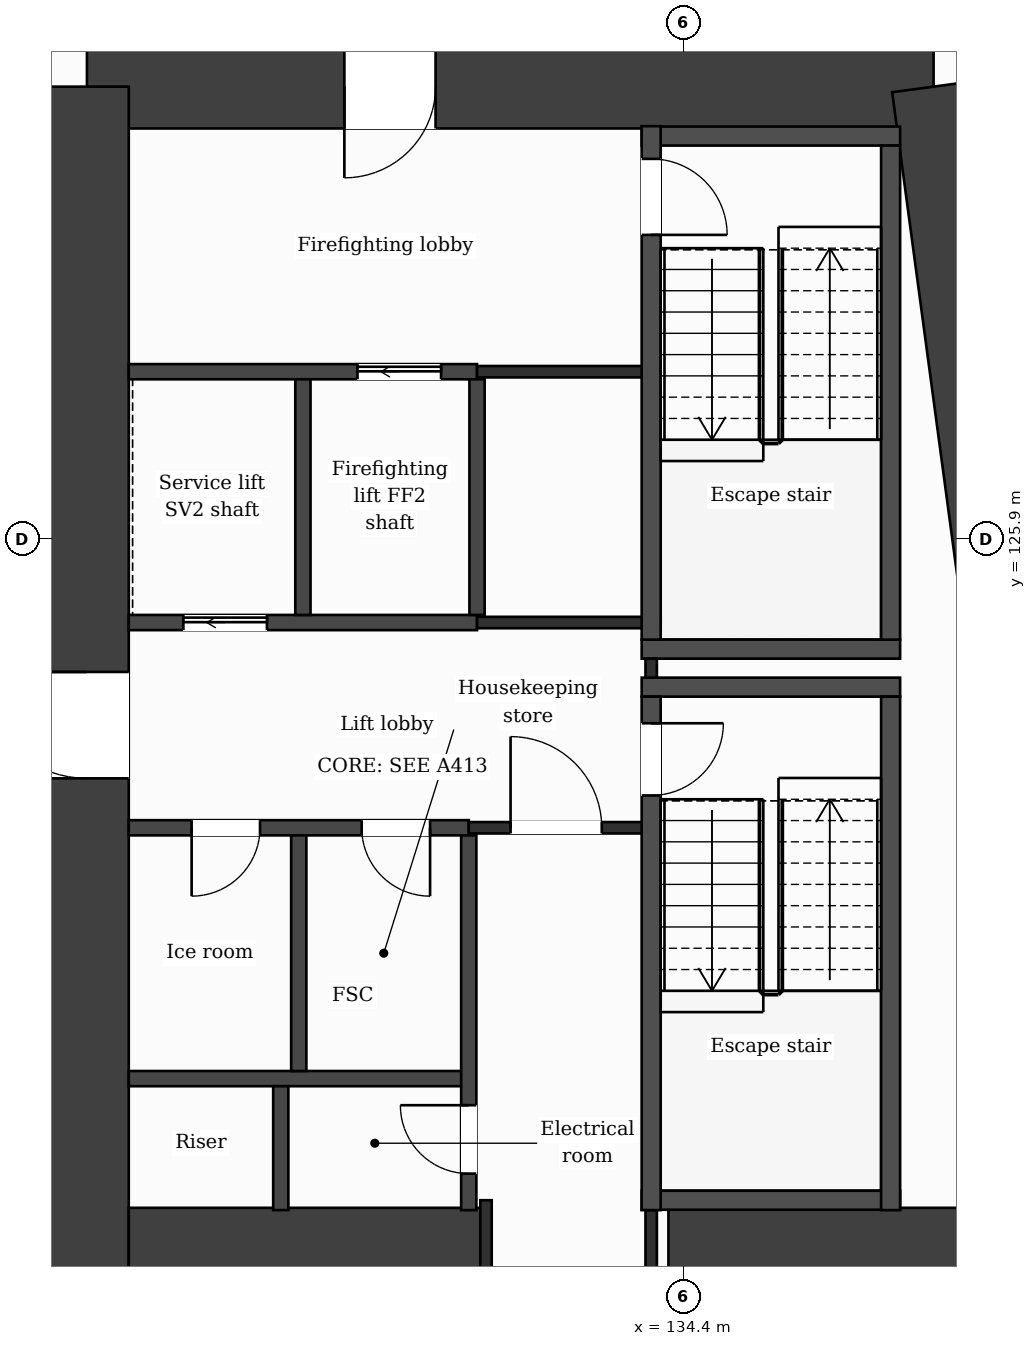
"""IFC4 building model, lengths in metres.
Left out: names, types, materials, properties, quantities, classifications, styles, units other than length and angle.
Written with IfcOpenShell. Run it as: python <this file> out.ifc"""

import sys

from ifc_helpers import new_model, si_unit, direction, frame, frame_2d, origin, place, context, subcontext, project, spatial, rectangle, extrude, element, fill, save


model = new_model("IFC4")
c1 = context("Model", 3, precision=1e-05, world=origin(), true_north=direction((0.0, 1.0)))
c2 = subcontext(c1, "Body", "Model", "MODEL_VIEW")
j1 = project(units=[si_unit("LENGTHUNIT", "METRE"), si_unit("PLANEANGLEUNIT", "RADIAN")], contexts=[c1])
p1 = place(None, origin())
s1 = spatial("IfcSite", under=j1, at=p1, CompositionType="ELEMENT")
p2 = place(p1, origin())
s2 = spatial("IfcBuilding", under=s1, at=p2, CompositionType="ELEMENT")
p3 = place(p2, frame((0.0, 0.0, 60.0)))
s3 = spatial("IfcBuildingStorey", under=s2, at=p3, CompositionType="ELEMENT", Elevation=60.0)
p4 = place(p3, frame((126.55, 131.85, 0.0), z_axis=(0.0, 0.0, 1.0), x_axis=(1.0, 0.0, 0.0)))
e1 = element("IfcWall", 1, at=p4, inside=s3, PredefinedType="SHEAR", context=c2, shape_type="SweptSolid", body=[
    extrude(rectangle(XDim=11.138, YDim=1.1, at=frame_2d((5.569, 0.0))), origin(), (0.0, 0.0, 1.0), 3.5),
])
p5 = place(p4, frame((3.386, 0.0, 0.0)))
e2 = element("IfcOpeningElement", 2, at=p5, cuts=e1, PredefinedType="OPENING", context=c2, shape_type="SweptSolid", body=[
    extrude(rectangle(XDim=1.2, YDim=2.1, at=frame_2d((0.6, 1.05))), frame((0.0, 0.56, 0.0), z_axis=(0.0, -1.0, 0.0), x_axis=(1.0, 0.0, 0.0)), (0.0, 0.0, 1.0), 1.12),
])
p6 = place(p3, frame((137.688, 131.85, 0.0), z_axis=(0.0, 0.0, 1.0), x_axis=(0.133411793472, -0.991060691059, 0.0)))
e3 = element("IfcWall", 3, at=p6, inside=s3, PredefinedType="SHEAR", context=c2, shape_type="SweptSolid", body=[
    extrude(rectangle(XDim=21.089, YDim=1.1, at=frame_2d((10.544, 0.0))), origin(), (0.0, 0.0, 1.0), 3.5),
])
p7 = place(p3, frame((126.55, 110.95, 0.0), z_axis=(0.0, 0.0, 1.0), x_axis=(0.0, 1.0, 0.0)))
e4 = element("IfcWall", 4, at=p7, inside=s3, PredefinedType="SHEAR", context=c2, shape_type="SweptSolid", body=[
    extrude(rectangle(XDim=20.9, YDim=1.1, at=frame_2d((10.45, 0.0))), origin(), (0.0, 0.0, 1.0), 3.5),
])
p8 = place(p7, frame((11.8, 0.0, 0.0)))
e5 = element("IfcOpeningElement", 5, at=p8, cuts=e4, PredefinedType="OPENING", context=c2, shape_type="SweptSolid", body=[
    extrude(rectangle(XDim=1.4, YDim=2.1, at=frame_2d((0.7, 1.05))), frame((0.0, 0.56, 0.0), z_axis=(0.0, -1.0, 0.0), x_axis=(1.0, 0.0, 0.0)), (0.0, 0.0, 1.0), 1.12),
])
p9 = place(p3, frame((127.1, 116.55, 0.0), z_axis=(0.0, 0.0, 1.0), x_axis=(1.0, 0.0, 0.0)))
e6 = element("IfcWall", 6, at=p9, inside=s3, PredefinedType="SHEAR", context=c2, shape_type="SweptSolid", body=[
    extrude(rectangle(XDim=4.7, YDim=1.1, at=frame_2d((2.35, 0.0))), origin(), (0.0, 0.0, 1.0), 3.5),
])
p10 = place(p3, frame((134.2, 116.55, 0.0), z_axis=(0.0, 0.0, 1.0), x_axis=(1.0, 0.0, 0.0)))
e7 = element("IfcWall", 7, at=p10, inside=s3, PredefinedType="SHEAR", context=c2, shape_type="SweptSolid", body=[
    extrude(rectangle(XDim=5.077, YDim=1.1, at=frame_2d((2.539, 0.0))), origin(), (0.0, 0.0, 1.0), 3.5),
])
p11 = place(p3, frame((133.848, 117.2, 0.0), z_axis=(0.0, 0.0, 1.0), x_axis=(1.0, 0.0, 0.0)))
e8 = element("IfcWall", 8, at=p11, inside=s3, PredefinedType="PARTITIONING", context=c2, shape_type="SweptSolid", body=[
    extrude(rectangle(XDim=3.4, YDim=0.25, at=frame_2d((1.7, 0.0))), origin(), (0.0, 0.0, 1.0), 3.18),
])
p12 = place(p3, frame((127.1, 118.8, 0.0), z_axis=(0.0, 0.0, 1.0), x_axis=(1.0, 0.0, 0.0)))
e9 = element("IfcWall", 9, at=p12, inside=s3, PredefinedType="PARTITIONING", context=c2, shape_type="SweptSolid", body=[
    extrude(rectangle(XDim=4.473, YDim=0.2, at=frame_2d((2.236, 0.0))), origin(), (0.0, 0.0, 1.0), 3.18),
])
p13 = place(p3, frame((127.1, 122.1, 0.0), z_axis=(0.0, 0.0, 1.0), x_axis=(1.0, 0.0, 0.0)))
e10 = element("IfcWall", 10, at=p13, inside=s3, PredefinedType="PARTITIONING", context=c2, shape_type="SweptSolid", body=[
    extrude(rectangle(XDim=4.473, YDim=0.2, at=frame_2d((2.236, 0.0))), origin(), (0.0, 0.0, 1.0), 3.18),
])
p14 = place(p13, frame((3.064, 0.0, 0.0)))
e11 = element("IfcOpeningElement", 11, at=p14, cuts=e10, PredefinedType="OPENING", context=c2, shape_type="SweptSolid", body=[
    extrude(rectangle(XDim=0.9, YDim=2.1, at=frame_2d((0.45, 1.05))), frame((0.0, 0.11, 0.0), z_axis=(0.0, -1.0, 0.0), x_axis=(1.0, 0.0, 0.0)), (0.0, 0.0, 1.0), 0.22),
])
p15 = place(p13, frame((0.827, 0.0, 0.0)))
e12 = element("IfcOpeningElement", 12, at=p15, cuts=e10, PredefinedType="OPENING", context=c2, shape_type="SweptSolid", body=[
    extrude(rectangle(XDim=0.9, YDim=2.1, at=frame_2d((0.45, 1.05))), frame((0.0, 0.11, 0.0), z_axis=(0.0, -1.0, 0.0), x_axis=(1.0, 0.0, 0.0)), (0.0, 0.0, 1.0), 0.22),
])
p16 = place(p3, frame((131.573, 122.1, 0.0), z_axis=(0.0, 0.0, 1.0), x_axis=(1.0, 0.0, 0.0)))
e13 = element("IfcWall", 13, at=p16, inside=s3, PredefinedType="PARTITIONING", context=c2, shape_type="SweptSolid", body=[
    extrude(rectangle(XDim=2.4, YDim=0.15, at=frame_2d((1.2, 0.0))), origin(), (0.0, 0.0, 1.0), 3.18),
])
p17 = place(p16, frame((0.55, 0.0, 0.0)))
e14 = element("IfcOpeningElement", 14, at=p17, cuts=e13, PredefinedType="OPENING", context=c2, shape_type="SweptSolid", body=[
    extrude(rectangle(XDim=1.2, YDim=2.1, at=frame_2d((0.6, 1.05))), frame((0.0, 0.085, 0.0), z_axis=(0.0, -1.0, 0.0), x_axis=(1.0, 0.0, 0.0)), (0.0, 0.0, 1.0), 0.17),
])
for number, where, z_axis, x_axis in (
    (15, (133.848, 123.95, 0.0), (0.0, 0.0, 1.0), (1.0, 0.0, 0.0)),
    (16, (133.848, 124.45, 0.0), (0.0, 0.0, 1.0), (1.0, 0.0, 0.0)),
):
    element("IfcWall", number, at=place(p3, frame(where, z_axis=z_axis, x_axis=x_axis)), inside=s3, PredefinedType="PARTITIONING", context=c2, shape_type="SweptSolid", body=[
        extrude(rectangle(XDim=3.4, YDim=0.25, at=frame_2d((1.7, 0.0))), origin(), (0.0, 0.0, 1.0), 3.18),
    ])
p18 = place(p3, frame((127.1, 124.8, 0.0), z_axis=(0.0, 0.0, 1.0), x_axis=(1.0, 0.0, 0.0)))
e17 = element("IfcWall", 17, at=p18, inside=s3, PredefinedType="PARTITIONING", context=c2, shape_type="SweptSolid", body=[
    extrude(rectangle(XDim=4.582, YDim=0.2, at=frame_2d((2.291, 0.0))), origin(), (0.0, 0.0, 1.0), 3.18),
])
p19 = place(p18, frame((0.718, 0.0, 0.0)))
e18 = element("IfcOpeningElement", 18, at=p19, cuts=e17, PredefinedType="OPENING", context=c2, shape_type="SweptSolid", body=[
    extrude(rectangle(XDim=1.1, YDim=2.1, at=frame_2d((0.55, 1.05))), frame((0.0, 0.11, 0.0), z_axis=(0.0, -1.0, 0.0), x_axis=(1.0, 0.0, 0.0)), (0.0, 0.0, 1.0), 0.22),
])
p20 = place(p3, frame((131.682, 124.8, 0.0), z_axis=(0.0, 0.0, 1.0), x_axis=(1.0, 0.0, 0.0)))
e19 = element("IfcWall", 19, at=p20, inside=s3, PredefinedType="PARTITIONING", context=c2, shape_type="SweptSolid", body=[
    extrude(rectangle(XDim=2.416, YDim=0.15, at=frame_2d((1.208, 0.0))), origin(), (0.0, 0.0, 1.0), 3.18),
])
p21 = place(p3, frame((127.1, 128.1, 0.0), z_axis=(0.0, 0.0, 1.0), x_axis=(1.0, 0.0, 0.0)))
e20 = element("IfcWall", 20, at=p21, inside=s3, PredefinedType="PARTITIONING", context=c2, shape_type="SweptSolid", body=[
    extrude(rectangle(XDim=4.582, YDim=0.2, at=frame_2d((2.291, 0.0))), origin(), (0.0, 0.0, 1.0), 3.18),
])
p22 = place(p21, frame((3.009, 0.0, 0.0)))
e21 = element("IfcOpeningElement", 21, at=p22, cuts=e20, PredefinedType="OPENING", context=c2, shape_type="SweptSolid", body=[
    extrude(rectangle(XDim=1.1, YDim=2.1, at=frame_2d((0.55, 1.05))), frame((0.0, 0.11, 0.0), z_axis=(0.0, -1.0, 0.0), x_axis=(1.0, 0.0, 0.0)), (0.0, 0.0, 1.0), 0.22),
])
p23 = place(p3, frame((131.682, 128.1, 0.0), z_axis=(0.0, 0.0, 1.0), x_axis=(1.0, 0.0, 0.0)))
e22 = element("IfcWall", 22, at=p23, inside=s3, PredefinedType="PARTITIONING", context=c2, shape_type="SweptSolid", body=[
    extrude(rectangle(XDim=2.291, YDim=0.15, at=frame_2d((1.146, 0.0))), origin(), (0.0, 0.0, 1.0), 3.18),
])
p24 = place(p3, frame((133.848, 131.2, 0.0), z_axis=(0.0, 0.0, 1.0), x_axis=(1.0, 0.0, 0.0)))
e23 = element("IfcWall", 23, at=p24, inside=s3, PredefinedType="PARTITIONING", context=c2, shape_type="SweptSolid", body=[
    extrude(rectangle(XDim=3.4, YDim=0.25, at=frame_2d((1.7, 0.0))), origin(), (0.0, 0.0, 1.0), 3.18),
])
p25 = place(p3, frame((129.1, 117.07, 0.0), z_axis=(0.0, 0.0, 1.0), x_axis=(0.0, 1.0, 0.0)))
e24 = element("IfcWall", 24, at=p25, inside=s3, PredefinedType="PARTITIONING", context=c2, shape_type="SweptSolid", body=[
    extrude(rectangle(XDim=1.63, YDim=0.2, at=frame_2d((0.815, 0.0))), origin(), (0.0, 0.0, 1.0), 3.18),
])
for number, where, z_axis, x_axis in (
    (25, (129.336, 118.9, 0.0), (0.0, 0.0, 1.0), (0.0, 1.0, 0.0)),
    (26, (129.391, 124.9, 0.0), (0.0, 0.0, 1.0), (0.0, 1.0, 0.0)),
):
    element("IfcWall", number, at=place(p3, frame(where, z_axis=z_axis, x_axis=x_axis)), inside=s3, PredefinedType="PARTITIONING", context=c2, shape_type="SweptSolid", body=[
        extrude(rectangle(XDim=3.1, YDim=0.2, at=frame_2d((1.55, 0.0))), origin(), (0.0, 0.0, 1.0), 3.18),
    ])
p26 = place(p3, frame((131.573, 117.07, 0.0), z_axis=(0.0, 0.0, 1.0), x_axis=(0.0, 1.0, 0.0)))
e27 = element("IfcWall", 27, at=p26, inside=s3, PredefinedType="PARTITIONING", context=c2, shape_type="SweptSolid", body=[
    extrude(rectangle(XDim=4.93, YDim=0.2, at=frame_2d((2.465, 0.0))), origin(), (0.0, 0.0, 1.0), 3.18),
])
p27 = place(p26, frame((0.48, 0.0, 0.0)))
e28 = element("IfcOpeningElement", 28, at=p27, cuts=e27, PredefinedType="OPENING", context=c2, shape_type="SweptSolid", body=[
    extrude(rectangle(XDim=0.9, YDim=2.1, at=frame_2d((0.45, 1.05))), frame((0.0, 0.11, 0.0), z_axis=(0.0, -1.0, 0.0), x_axis=(1.0, 0.0, 0.0)), (0.0, 0.0, 1.0), 0.22),
])
p28 = place(p3, frame((131.682, 124.9, 0.0), z_axis=(0.0, 0.0, 1.0), x_axis=(0.0, 1.0, 0.0)))
e29 = element("IfcWall", 29, at=p28, inside=s3, PredefinedType="PARTITIONING", context=c2, shape_type="SweptSolid", body=[
    extrude(rectangle(XDim=3.1, YDim=0.2, at=frame_2d((1.55, 0.0))), origin(), (0.0, 0.0, 1.0), 3.18),
])
p29 = place(p3, frame((131.8, 116.0, 0.0), z_axis=(0.0, 0.0, 1.0), x_axis=(0.0, 1.0, 0.0)))
e30 = element("IfcWall", 30, at=p29, inside=s3, PredefinedType="PARTITIONING", context=c2, shape_type="SweptSolid", body=[
    extrude(rectangle(XDim=1.2, YDim=0.15, at=frame_2d((0.6, 0.0))), origin(), (0.0, 0.0, 1.0), 3.18),
])
p30 = place(p3, frame((133.973, 116.0, 0.0), z_axis=(0.0, 0.0, 1.0), x_axis=(0.0, 1.0, 0.0)))
e31 = element("IfcWall", 31, at=p30, inside=s3, PredefinedType="PARTITIONING", context=c2, shape_type="SweptSolid", body=[
    extrude(rectangle(XDim=1.07, YDim=0.15, at=frame_2d((0.535, 0.0))), origin(), (0.0, 0.0, 1.0), 3.18),
])
p31 = place(p3, frame((133.973, 124.075, 0.0), z_axis=(0.0, 0.0, 1.0), x_axis=(0.0, 1.0, 0.0)))
e32 = element("IfcWall", 32, at=p31, inside=s3, PredefinedType="PARTITIONING", context=c2, shape_type="SweptSolid", body=[
    extrude(rectangle(XDim=0.25, YDim=0.15, at=frame_2d((0.125, 0.0))), origin(), (0.0, 0.0, 1.0), 3.18),
])
p32 = place(p3, frame((133.973, 117.07, 0.0), z_axis=(0.0, 0.0, 1.0), x_axis=(0.0, 1.0, 0.0)))
e33 = element("IfcWall", 33, at=p32, inside=s3, PredefinedType="PARTITIONING", context=c2, shape_type="SweptSolid", body=[
    extrude(rectangle(XDim=6.755, YDim=0.25, at=frame_2d((3.377, 0.0))), origin(), (0.0, 0.0, 1.0), 3.18),
])
p33 = place(p32, frame((5.455, 0.0, 0.0)))
e34 = element("IfcOpeningElement", 34, at=p33, cuts=e33, PredefinedType="OPENING", context=c2, shape_type="SweptSolid", body=[
    extrude(rectangle(XDim=0.95, YDim=2.1, at=frame_2d((0.475, 1.05))), frame((0.0, 0.135, 0.0), z_axis=(0.0, -1.0, 0.0), x_axis=(1.0, 0.0, 0.0)), (0.0, 0.0, 1.0), 0.27),
])
p34 = place(p3, frame((133.973, 124.575, 0.0), z_axis=(0.0, 0.0, 1.0), x_axis=(0.0, 1.0, 0.0)))
e35 = element("IfcWall", 35, at=p34, inside=s3, PredefinedType="PARTITIONING", context=c2, shape_type="SweptSolid", body=[
    extrude(rectangle(XDim=6.755, YDim=0.25, at=frame_2d((3.377, 0.0))), origin(), (0.0, 0.0, 1.0), 3.18),
])
p35 = place(p34, frame((5.325, 0.0, 0.0)))
e36 = element("IfcOpeningElement", 36, at=p35, cuts=e35, PredefinedType="OPENING", context=c2, shape_type="SweptSolid", body=[
    extrude(rectangle(XDim=1.0, YDim=2.1, at=frame_2d((0.5, 1.05))), frame((0.0, 0.135, 0.0), z_axis=(0.0, -1.0, 0.0), x_axis=(1.0, 0.0, 0.0)), (0.0, 0.0, 1.0), 0.27),
])
p36 = place(p3, frame((137.123, 117.07, 0.0), z_axis=(0.0, 0.0, 1.0), x_axis=(0.0, 1.0, 0.0)))
e37 = element("IfcWall", 37, at=p36, inside=s3, PredefinedType="PARTITIONING", context=c2, shape_type="SweptSolid", body=[
    extrude(rectangle(XDim=6.755, YDim=0.25, at=frame_2d((3.377, 0.0))), origin(), (0.0, 0.0, 1.0), 3.18),
])
p37 = place(p3, frame((137.123, 124.575, 0.0), z_axis=(0.0, 0.0, 1.0), x_axis=(0.0, 1.0, 0.0)))
e38 = element("IfcWall", 38, at=p37, inside=s3, PredefinedType="PARTITIONING", context=c2, shape_type="SweptSolid", body=[
    extrude(rectangle(XDim=6.5, YDim=0.25, at=frame_2d((3.25, 0.0))), origin(), (0.0, 0.0, 1.0), 3.18),
])
p38 = place(p17, origin())
e39 = element("IfcDoor", 39, at=p38, inside=s3, OperationType="SINGLE_SWING_LEFT", PredefinedType="DOOR", context=c2, shape_type="SweptSolid", body=[
    extrude(rectangle(XDim=1.2, YDim=2.1, at=frame_2d((0.6, 1.05))), frame((0.0, 0.025, 0.0), z_axis=(0.0, -1.0, 0.0), x_axis=(1.0, 0.0, 0.0)), (0.0, 0.0, 1.0), 0.05),
])
fill(e14, e39)
p39 = place(p22, origin())
e40 = element("IfcDoor", 40, at=p39, inside=s3, OperationType="SLIDING_TO_LEFT", PredefinedType="DOOR", context=c2, shape_type="SweptSolid", body=[
    extrude(rectangle(XDim=1.1, YDim=2.1, at=frame_2d((0.55, 1.05))), frame((0.0, 0.025, 0.0), z_axis=(0.0, -1.0, 0.0), x_axis=(1.0, 0.0, 0.0)), (0.0, 0.0, 1.0), 0.05),
])
fill(e21, e40)
p40 = place(p19, origin())
e41 = element("IfcDoor", 41, at=p40, inside=s3, OperationType="SLIDING_TO_LEFT", PredefinedType="DOOR", context=c2, shape_type="SweptSolid", body=[
    extrude(rectangle(XDim=1.1, YDim=2.1, at=frame_2d((0.55, 1.05))), frame((0.0, 0.025, 0.0), z_axis=(0.0, -1.0, 0.0), x_axis=(1.0, 0.0, 0.0)), (0.0, 0.0, 1.0), 0.05),
])
fill(e18, e41)
p41 = place(p14, origin())
e42 = element("IfcDoor", 42, at=p41, inside=s3, OperationType="SINGLE_SWING_RIGHT", PredefinedType="DOOR", context=c2, shape_type="SweptSolid", body=[
    extrude(rectangle(XDim=0.9, YDim=2.1, at=frame_2d((0.45, 1.05))), frame((0.0, 0.025, 0.0), z_axis=(0.0, -1.0, 0.0), x_axis=(1.0, 0.0, 0.0)), (0.0, 0.0, 1.0), 0.05),
])
fill(e11, e42)
p42 = place(p15, origin())
e43 = element("IfcDoor", 43, at=p42, inside=s3, OperationType="SINGLE_SWING_LEFT", PredefinedType="DOOR", context=c2, shape_type="SweptSolid", body=[
    extrude(rectangle(XDim=0.9, YDim=2.1, at=frame_2d((0.45, 1.05))), frame((0.0, 0.025, 0.0), z_axis=(0.0, -1.0, 0.0), x_axis=(1.0, 0.0, 0.0)), (0.0, 0.0, 1.0), 0.05),
])
fill(e12, e43)
p43 = place(p33, origin())
e44 = element("IfcDoor", 44, at=p43, inside=s3, OperationType="SINGLE_SWING_RIGHT", PredefinedType="DOOR", context=c2, shape_type="SweptSolid", body=[
    extrude(rectangle(XDim=0.95, YDim=2.1, at=frame_2d((0.475, 1.05))), frame((0.0, 0.025, 0.0), z_axis=(0.0, -1.0, 0.0), x_axis=(1.0, 0.0, 0.0)), (0.0, 0.0, 1.0), 0.05),
])
fill(e34, e44)
p44 = place(p35, origin())
e45 = element("IfcDoor", 45, at=p44, inside=s3, OperationType="SINGLE_SWING_LEFT", PredefinedType="DOOR", context=c2, shape_type="SweptSolid", body=[
    extrude(rectangle(XDim=1.0, YDim=2.1, at=frame_2d((0.5, 1.05))), frame((0.0, 0.025, 0.0), z_axis=(0.0, -1.0, 0.0), x_axis=(1.0, 0.0, 0.0)), (0.0, 0.0, 1.0), 0.05),
])
fill(e36, e45)
p45 = place(p27, origin())
e46 = element("IfcDoor", 46, at=p45, inside=s3, OperationType="SINGLE_SWING_RIGHT", PredefinedType="DOOR", context=c2, shape_type="SweptSolid", body=[
    extrude(rectangle(XDim=0.9, YDim=2.1, at=frame_2d((0.45, 1.05))), frame((0.0, 0.025, 0.0), z_axis=(0.0, -1.0, 0.0), x_axis=(1.0, 0.0, 0.0)), (0.0, 0.0, 1.0), 0.05),
])
fill(e28, e46)
p46 = place(p5, origin())
e47 = element("IfcDoor", 47, at=p46, inside=s3, OperationType="SINGLE_SWING_LEFT", PredefinedType="DOOR", context=c2, shape_type="SweptSolid", body=[
    extrude(rectangle(XDim=1.2, YDim=2.1, at=frame_2d((0.6, 1.05))), frame((0.0, 0.025, 0.0), z_axis=(0.0, -1.0, 0.0), x_axis=(1.0, 0.0, 0.0)), (0.0, 0.0, 1.0), 0.05),
])
fill(e2, e47)
p47 = place(p8, origin())
e48 = element("IfcDoor", 48, at=p47, inside=s3, OperationType="SINGLE_SWING_RIGHT", PredefinedType="DOOR", context=c2, shape_type="SweptSolid", body=[
    extrude(rectangle(XDim=1.4, YDim=2.1, at=frame_2d((0.7, 1.05))), frame((0.0, 0.025, 0.0), z_axis=(0.0, -1.0, 0.0), x_axis=(1.0, 0.0, 0.0)), (0.0, 0.0, 1.0), 0.05),
])
fill(e5, e48)
save(model, sys.argv[1])
